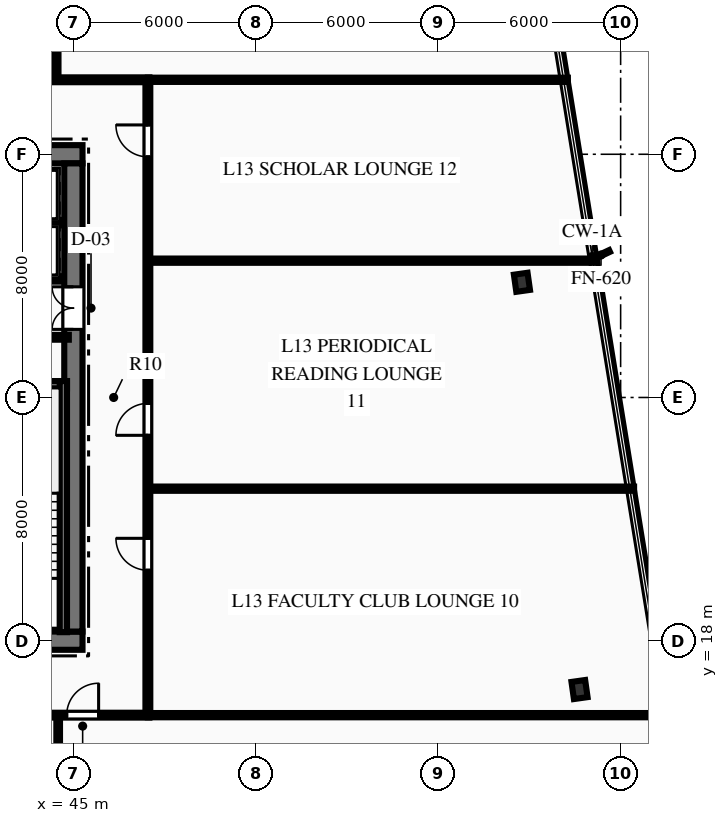
"""IFC4 building model, lengths in metres.
Left out: names, types, materials, properties, quantities, classifications, styles, units other than length and angle.
Written with IfcOpenShell. Run it as: python <this file> out.ifc"""

import sys

from ifc_helpers import new_model, si_unit, direction, frame, frame_2d, origin, origin_2d, place, context, subcontext, project, spatial, rectangle, i_section, extrude, element, fill, save


model = new_model("IFC4")
c1 = context("Model", 3, precision=1e-05, world=origin(), true_north=direction((0.0, 1.0)))
c2 = subcontext(c1, "Body", "Model", "MODEL_VIEW")
j1 = project(units=[si_unit("LENGTHUNIT", "METRE"), si_unit("PLANEANGLEUNIT", "RADIAN")], contexts=[c1])
p1 = place(None, origin())
s1 = spatial("IfcSite", under=j1, at=p1, CompositionType="ELEMENT")
p2 = place(p1, origin())
s2 = spatial("IfcBuilding", under=s1, at=p2, CompositionType="ELEMENT")
p3 = place(p2, frame((0.0, 0.0, 58.95)))
s3 = spatial("IfcBuildingStorey", under=s2, at=p3, CompositionType="ELEMENT", Elevation=58.95)
p4 = place(p3, frame((26.7, 18.0, 0.0), z_axis=(0.0, 0.0, 1.0), x_axis=(1.0, 0.0, 0.0)))
e1 = element("IfcWall", 1, at=p4, inside=s3, PredefinedType="SHEAR", context=c2, shape_type="SweptSolid", body=[
    extrude(rectangle(XDim=18.6, YDim=0.6, at=frame_2d((9.3, 0.0))), origin(), (0.0, 0.0, 1.0), 3.75),
])
p5 = place(p4, frame((7.4, 0.0, 0.0)))
e2 = element("IfcOpeningElement", 2, at=p5, cuts=e1, PredefinedType="OPENING", context=c2, shape_type="SweptSolid", body=[
    extrude(rectangle(XDim=1.1, YDim=2.15, at=frame_2d((0.55, 1.075))), frame((0.0, 0.31, 0.0), z_axis=(0.0, -1.0, 0.0), x_axis=(1.0, 0.0, 0.0)), (0.0, 0.0, 1.0), 0.62),
])
p6 = place(p4, frame((10.1, 0.0, 0.0)))
e3 = element("IfcOpeningElement", 3, at=p6, cuts=e1, PredefinedType="OPENING", context=c2, shape_type="SweptSolid", body=[
    extrude(rectangle(XDim=1.1, YDim=2.15, at=frame_2d((0.55, 1.075))), frame((0.0, 0.31, 0.0), z_axis=(0.0, -1.0, 0.0), x_axis=(1.0, 0.0, 0.0)), (0.0, 0.0, 1.0), 0.62),
])
p7 = place(p3, frame((26.7, 34.0, 0.0), z_axis=(0.0, 0.0, 1.0), x_axis=(1.0, 0.0, 0.0)))
e4 = element("IfcWall", 4, at=p7, inside=s3, PredefinedType="SHEAR", context=c2, shape_type="SweptSolid", body=[
    extrude(rectangle(XDim=18.6, YDim=0.6, at=frame_2d((9.3, 0.0))), origin(), (0.0, 0.0, 1.0), 3.75),
])
p8 = place(p7, frame((1.265, 0.0, 0.0)))
e5 = element("IfcOpeningElement", 5, at=p8, cuts=e4, PredefinedType="OPENING", context=c2, shape_type="SweptSolid", body=[
    extrude(rectangle(XDim=1.1, YDim=2.15, at=frame_2d((0.55, 1.075))), frame((0.0, 0.31, 0.0), z_axis=(0.0, -1.0, 0.0), x_axis=(1.0, 0.0, 0.0)), (0.0, 0.0, 1.0), 0.62),
])
p9 = place(p7, frame((3.515, 0.0, 0.0)))
e6 = element("IfcOpeningElement", 6, at=p9, cuts=e4, PredefinedType="OPENING", context=c2, shape_type="SweptSolid", body=[
    extrude(rectangle(XDim=1.1, YDim=2.15, at=frame_2d((0.55, 1.075))), frame((0.0, 0.31, 0.0), z_axis=(0.0, -1.0, 0.0), x_axis=(1.0, 0.0, 0.0)), (0.0, 0.0, 1.0), 0.62),
])
p10 = place(p7, frame((13.985, 0.0, 0.0)))
e7 = element("IfcOpeningElement", 7, at=p10, cuts=e4, PredefinedType="OPENING", context=c2, shape_type="SweptSolid", body=[
    extrude(rectangle(XDim=1.1, YDim=2.15, at=frame_2d((0.55, 1.075))), frame((0.0, 0.31, 0.0), z_axis=(0.0, -1.0, 0.0), x_axis=(1.0, 0.0, 0.0)), (0.0, 0.0, 1.0), 0.62),
])
p11 = place(p7, frame((16.235, 0.0, 0.0)))
e8 = element("IfcOpeningElement", 8, at=p11, cuts=e4, PredefinedType="OPENING", context=c2, shape_type="SweptSolid", body=[
    extrude(rectangle(XDim=1.1, YDim=2.15, at=frame_2d((0.55, 1.075))), frame((0.0, 0.31, 0.0), z_axis=(0.0, -1.0, 0.0), x_axis=(1.0, 0.0, 0.0)), (0.0, 0.0, 1.0), 0.62),
])
p12 = place(p3, frame((45.0, 18.3, 0.0), z_axis=(0.0, 0.0, 1.0), x_axis=(0.0, 1.0, 0.0)))
e9 = element("IfcWall", 9, at=p12, inside=s3, PredefinedType="SHEAR", context=c2, shape_type="SweptSolid", body=[
    extrude(rectangle(XDim=15.4, YDim=0.6, at=frame_2d((7.7, 0.0))), origin(), (0.0, 0.0, 1.0), 3.75),
])
p13 = place(p12, frame((9.94, 0.0, 0.0)))
e10 = element("IfcOpeningElement", 10, at=p13, cuts=e9, PredefinedType="OPENING", context=c2, shape_type="SweptSolid", body=[
    extrude(rectangle(XDim=1.4, YDim=2.2, at=frame_2d((0.7, 1.1))), frame((0.0, 0.31, 0.0), z_axis=(0.0, -1.0, 0.0), x_axis=(1.0, 0.0, 0.0)), (0.0, 0.0, 1.0), 0.62),
])
p14 = place(p3, frame((40.81, 26.42, 0.0), z_axis=(0.0, 0.0, 1.0), x_axis=(1.0, 0.0, 0.0)))
e11 = element("IfcWall", 11, at=p14, inside=s3, PredefinedType="SHEAR", context=c2, shape_type="SweptSolid", body=[
    extrude(rectangle(XDim=3.98, YDim=0.24, at=frame_2d((1.99, 0.0))), origin(), (0.0, 0.0, 1.0), 3.75),
])
p15 = place(p3, frame((44.67, 18.28, 0.0), z_axis=(0.0, 0.0, 1.0), x_axis=(0.0, 1.0, 0.0)))
e12 = element("IfcWall", 12, at=p15, inside=s3, PredefinedType="SHEAR", context=c2, shape_type="SweptSolid", body=[
    extrude(rectangle(XDim=8.26, YDim=0.24, at=frame_2d((4.13, 0.0))), origin(), (0.0, 0.0, 1.0), 3.75),
])
for number, where, z_axis, x_axis in (
    (13, (61.648, 16.393, 0.0), (0.0, 0.0, 1.0), (0.99, 0.14, 0.0)),
    (14, (59.753, 29.789, 0.0), (0.0, 0.0, 1.0), (0.99, 0.14, 0.0)),
):
    element("IfcColumn", number, at=place(p3, frame(where, z_axis=z_axis, x_axis=x_axis)), inside=s3, PredefinedType="COLUMN", context=c2, shape_type="SweptSolid", body=[
        extrude(i_section(OverallWidth=0.454, OverallDepth=0.569, WebThickness=0.078, FlangeThickness=0.125, at=origin_2d()), origin(), (0.0, 0.0, 1.0), 3.75),
    ])
p16 = place(p3, frame((40.8, 27.98, 0.0), z_axis=(0.0, 0.0, 1.0), x_axis=(1.0, 0.0, 0.0)))
e15 = element("IfcWall", 15, at=p16, inside=s3, PredefinedType="PARTITIONING", context=c2, shape_type="SweptSolid", body=[
    extrude(rectangle(XDim=4.05, YDim=0.16, at=frame_2d((2.025, 0.0))), origin(), (0.0, 0.0, 1.0), 3.44),
])
p17 = place(p16, frame((0.407, 0.0, 0.0)))
e16 = element("IfcOpeningElement", 16, at=p17, cuts=e15, PredefinedType="OPENING", context=c2, shape_type="SweptSolid", body=[
    extrude(rectangle(XDim=0.9, YDim=2.15, at=frame_2d((0.45, 1.075))), frame((0.0, 0.09, 0.0), z_axis=(0.0, -1.0, 0.0), x_axis=(1.0, 0.0, 0.0)), (0.0, 0.0, 1.0), 0.18),
])
p18 = place(p16, frame((2.2, 0.0, 0.0)))
e17 = element("IfcOpeningElement", 17, at=p18, cuts=e15, PredefinedType="OPENING", context=c2, shape_type="SweptSolid", body=[
    extrude(rectangle(XDim=0.9, YDim=2.15, at=frame_2d((0.45, 1.075))), frame((0.0, 0.09, 0.0), z_axis=(0.0, -1.0, 0.0), x_axis=(1.0, 0.0, 0.0)), (0.0, 0.0, 1.0), 0.18),
])
p19 = place(p3, frame((40.12, 29.9, 0.0), z_axis=(0.0, 0.0, 1.0), x_axis=(1.0, 0.0, 0.0)))
e18 = element("IfcWall", 18, at=p19, inside=s3, PredefinedType="PARTITIONING", context=c2, shape_type="SweptSolid", body=[
    extrude(rectangle(XDim=4.43, YDim=0.18, at=frame_2d((2.215, 0.0))), origin(), (0.0, 0.0, 1.0), 3.44),
])
p20 = place(p19, frame((0.565, 0.0, 0.0)))
e19 = element("IfcOpeningElement", 19, at=p20, cuts=e18, PredefinedType="OPENING", context=c2, shape_type="SweptSolid", body=[
    extrude(rectangle(XDim=1.1, YDim=2.15, at=frame_2d((0.55, 1.075))), frame((0.0, 0.1, 0.0), z_axis=(0.0, -1.0, 0.0), x_axis=(1.0, 0.0, 0.0)), (0.0, 0.0, 1.0), 0.2),
])
p21 = place(p19, frame((2.815, 0.0, 0.0)))
e20 = element("IfcOpeningElement", 20, at=p21, cuts=e18, PredefinedType="OPENING", context=c2, shape_type="SweptSolid", body=[
    extrude(rectangle(XDim=1.1, YDim=2.15, at=frame_2d((0.55, 1.075))), frame((0.0, 0.1, 0.0), z_axis=(0.0, -1.0, 0.0), x_axis=(1.0, 0.0, 0.0)), (0.0, 0.0, 1.0), 0.2),
])
p22 = place(p3, frame((40.12, 31.75, 0.0), z_axis=(0.0, 0.0, 1.0), x_axis=(1.0, 0.0, 0.0)))
e21 = element("IfcWall", 21, at=p22, inside=s3, PredefinedType="PARTITIONING", context=c2, shape_type="SweptSolid", body=[
    extrude(rectangle(XDim=4.43, YDim=0.18, at=frame_2d((2.215, 0.0))), origin(), (0.0, 0.0, 1.0), 3.44),
])
p23 = place(p3, frame((24.5, 15.55, 0.0), z_axis=(0.0, 0.0, 1.0), x_axis=(1.0, 0.0, 0.0)))
e22 = element("IfcWall", 22, at=p23, inside=s3, PredefinedType="PARTITIONING", context=c2, shape_type="SweptSolid", body=[
    extrude(rectangle(XDim=23.0, YDim=0.16, at=frame_2d((11.5, 0.0))), origin(), (0.0, 0.0, 1.0), 3.44),
])
p24 = place(p23, frame((3.101, 0.0, 0.0)))
e23 = element("IfcOpeningElement", 23, at=p24, cuts=e22, PredefinedType="OPENING", context=c2, shape_type="SweptSolid", body=[
    extrude(rectangle(XDim=1.05, YDim=2.15, at=frame_2d((0.525, 1.075))), frame((0.0, 0.09, 0.0), z_axis=(0.0, -1.0, 0.0), x_axis=(1.0, 0.0, 0.0)), (0.0, 0.0, 1.0), 0.18),
])
p25 = place(p23, frame((9.155, 0.0, 0.0)))
e24 = element("IfcOpeningElement", 24, at=p25, cuts=e22, PredefinedType="OPENING", context=c2, shape_type="SweptSolid", body=[
    extrude(rectangle(XDim=1.05, YDim=2.15, at=frame_2d((0.525, 1.075))), frame((0.0, 0.09, 0.0), z_axis=(0.0, -1.0, 0.0), x_axis=(1.0, 0.0, 0.0)), (0.0, 0.0, 1.0), 0.18),
])
p26 = place(p23, frame((20.28, 0.0, 0.0)))
e25 = element("IfcOpeningElement", 25, at=p26, cuts=e22, PredefinedType="OPENING", context=c2, shape_type="SweptSolid", body=[
    extrude(rectangle(XDim=1.05, YDim=2.15, at=frame_2d((0.525, 1.075))), frame((0.0, 0.09, 0.0), z_axis=(0.0, -1.0, 0.0), x_axis=(1.0, 0.0, 0.0)), (0.0, 0.0, 1.0), 0.18),
])
p27 = place(p3, frame((24.5, 36.45, 0.0), z_axis=(0.0, 0.0, 1.0), x_axis=(1.0, 0.0, 0.0)))
e26 = element("IfcWall", 26, at=p27, inside=s3, PredefinedType="PARTITIONING", context=c2, shape_type="SweptSolid", body=[
    extrude(rectangle(XDim=23.0, YDim=0.16, at=frame_2d((11.5, 0.0))), origin(), (0.0, 0.0, 1.0), 3.44),
])
p28 = place(p27, frame((13.75, 0.0, 0.0)))
e27 = element("IfcOpeningElement", 27, at=p28, cuts=e26, PredefinedType="OPENING", context=c2, shape_type="SweptSolid", body=[
    extrude(rectangle(XDim=0.9, YDim=2.15, at=frame_2d((0.45, 1.075))), frame((0.0, 0.09, 0.0), z_axis=(0.0, -1.0, 0.0), x_axis=(1.0, 0.0, 0.0)), (0.0, 0.0, 1.0), 0.18),
])
p29 = place(p27, frame((16.05, 0.0, 0.0)))
e28 = element("IfcOpeningElement", 28, at=p29, cuts=e26, PredefinedType="OPENING", context=c2, shape_type="SweptSolid", body=[
    extrude(rectangle(XDim=0.9, YDim=2.15, at=frame_2d((0.45, 1.075))), frame((0.0, 0.09, 0.0), z_axis=(0.0, -1.0, 0.0), x_axis=(1.0, 0.0, 0.0)), (0.0, 0.0, 1.0), 0.18),
])
p30 = place(p27, frame((18.3, 0.0, 0.0)))
e29 = element("IfcOpeningElement", 29, at=p30, cuts=e26, PredefinedType="OPENING", context=c2, shape_type="SweptSolid", body=[
    extrude(rectangle(XDim=1.0, YDim=2.15, at=frame_2d((0.5, 1.075))), frame((0.0, 0.09, 0.0), z_axis=(0.0, -1.0, 0.0), x_axis=(1.0, 0.0, 0.0)), (0.0, 0.0, 1.0), 0.18),
])
p31 = place(p27, frame((3.751, 0.0, 0.0)))
e30 = element("IfcOpeningElement", 30, at=p31, cuts=e26, PredefinedType="OPENING", context=c2, shape_type="SweptSolid", body=[
    extrude(rectangle(XDim=1.05, YDim=2.15, at=frame_2d((0.525, 1.075))), frame((0.0, 0.09, 0.0), z_axis=(0.0, -1.0, 0.0), x_axis=(1.0, 0.0, 0.0)), (0.0, 0.0, 1.0), 0.18),
])
p32 = place(p3, frame((47.45, 15.55, 0.0), z_axis=(0.0, 0.0, 1.0), x_axis=(0.0, 1.0, 0.0)))
e31 = element("IfcWall", 31, at=p32, inside=s3, PredefinedType="PARTITIONING", context=c2, shape_type="SweptSolid", body=[
    extrude(rectangle(XDim=20.9, YDim=0.16, at=frame_2d((10.45, 0.0))), origin(), (0.0, 0.0, 1.0), 3.44),
])
p33 = place(p32, frame((4.767, 0.0, 0.0)))
e32 = element("IfcOpeningElement", 32, at=p33, cuts=e31, PredefinedType="OPENING", context=c2, shape_type="SweptSolid", body=[
    extrude(rectangle(XDim=1.05, YDim=2.15, at=frame_2d((0.525, 1.075))), frame((0.0, 0.09, 0.0), z_axis=(0.0, -1.0, 0.0), x_axis=(1.0, 0.0, 0.0)), (0.0, 0.0, 1.0), 0.18),
])
p34 = place(p32, frame((9.205, 0.0, 0.0)))
e33 = element("IfcOpeningElement", 33, at=p34, cuts=e31, PredefinedType="OPENING", context=c2, shape_type="SweptSolid", body=[
    extrude(rectangle(XDim=1.05, YDim=2.15, at=frame_2d((0.525, 1.075))), frame((0.0, 0.09, 0.0), z_axis=(0.0, -1.0, 0.0), x_axis=(1.0, 0.0, 0.0)), (0.0, 0.0, 1.0), 0.18),
])
p35 = place(p32, frame((18.365, 0.0, 0.0)))
e34 = element("IfcOpeningElement", 34, at=p35, cuts=e31, PredefinedType="OPENING", context=c2, shape_type="SweptSolid", body=[
    extrude(rectangle(XDim=1.05, YDim=2.15, at=frame_2d((0.525, 1.075))), frame((0.0, 0.09, 0.0), z_axis=(0.0, -1.0, 0.0), x_axis=(1.0, 0.0, 0.0)), (0.0, 0.0, 1.0), 0.18),
])
p36 = place(p3, frame((44.45, 36.45, 0.0), z_axis=(0.0, 0.0, 1.0), x_axis=(0.0, 1.0, 0.0)))
e35 = element("IfcWall", 35, at=p36, inside=s3, PredefinedType="PARTITIONING", context=c2, shape_type="SweptSolid", body=[
    extrude(rectangle(XDim=3.9, YDim=0.12, at=frame_2d((1.95, 0.0))), origin(), (0.0, 0.0, 1.0), 3.44),
])
p37 = place(p3, frame((47.45, 15.55, 0.0), z_axis=(0.0, 0.0, 1.0), x_axis=(1.0, 0.0, 0.0)))
e36 = element("IfcWall", 36, at=p37, inside=s3, PredefinedType="PARTITIONING", context=c2, shape_type="SweptSolid", body=[
    extrude(rectangle(XDim=17.199, YDim=0.14, at=frame_2d((8.6, 0.0))), origin(), (0.0, 0.0, 1.0), 3.44),
])
p38 = place(p3, frame((47.45, 36.45, 0.0), z_axis=(0.0, 0.0, 1.0), x_axis=(1.0, 0.0, 0.0)))
e37 = element("IfcWall", 37, at=p38, inside=s3, PredefinedType="PARTITIONING", context=c2, shape_type="SweptSolid", body=[
    extrude(rectangle(XDim=13.814, YDim=0.14, at=frame_2d((6.907, 0.0))), origin(), (0.0, 0.0, 1.0), 3.44),
])
p39 = place(p3, frame((44.5, 2.269, 0.0), z_axis=(0.0, 0.0, 1.0), x_axis=(0.0, 1.0, 0.0)))
e38 = element("IfcWall", 38, at=p39, inside=s3, PredefinedType="PARTITIONING", context=c2, shape_type="SweptSolid", body=[
    extrude(rectangle(XDim=13.281, YDim=0.12, at=frame_2d((6.641, 0.0))), origin(), (0.0, 0.0, 1.0), 3.44),
])
p40 = place(p3, frame((47.45, 23.0, 0.0), z_axis=(0.0, 0.0, 1.0), x_axis=(1.0, 0.0, 0.0)))
e39 = element("IfcWall", 39, at=p40, inside=s3, PredefinedType="PARTITIONING", context=c2, shape_type="SweptSolid", body=[
    extrude(rectangle(XDim=15.993, YDim=0.14, at=frame_2d((7.996, 0.0))), origin(), (0.0, 0.0, 1.0), 3.44),
])
p41 = place(p3, frame((47.45, 30.5, 0.0), z_axis=(0.0, 0.0, 1.0), x_axis=(1.0, 0.0, 0.0)))
e40 = element("IfcWall", 40, at=p41, inside=s3, PredefinedType="PARTITIONING", context=c2, shape_type="SweptSolid", body=[
    extrude(rectangle(XDim=14.778, YDim=0.14, at=frame_2d((7.389, 0.0))), origin(), (0.0, 0.0, 1.0), 3.44),
])
p42 = place(p13, origin())
e41 = element("IfcDoor", 41, at=p42, inside=s3, OperationType="DOUBLE_DOOR_SINGLE_SWING", PredefinedType="DOOR", context=c2, shape_type="SweptSolid", body=[
    extrude(rectangle(XDim=1.4, YDim=2.2, at=frame_2d((0.7, 1.1))), frame((0.0, 0.025, 0.0), z_axis=(0.0, -1.0, 0.0), x_axis=(1.0, 0.0, 0.0)), (0.0, 0.0, 1.0), 0.05),
])
fill(e10, e41)
p43 = place(p26, origin())
e42 = element("IfcDoor", 42, at=p43, inside=s3, OperationType="SINGLE_SWING_RIGHT", PredefinedType="DOOR", context=c2, shape_type="SweptSolid", body=[
    extrude(rectangle(XDim=1.05, YDim=2.15, at=frame_2d((0.525, 1.075))), frame((0.0, 0.025, 0.0), z_axis=(0.0, -1.0, 0.0), x_axis=(1.0, 0.0, 0.0)), (0.0, 0.0, 1.0), 0.05),
])
fill(e25, e42)
p44 = place(p33, origin())
e43 = element("IfcDoor", 43, at=p44, inside=s3, OperationType="SINGLE_SWING_RIGHT", PredefinedType="DOOR", context=c2, shape_type="SweptSolid", body=[
    extrude(rectangle(XDim=1.05, YDim=2.15, at=frame_2d((0.525, 1.075))), frame((0.0, 0.025, 0.0), z_axis=(0.0, -1.0, 0.0), x_axis=(1.0, 0.0, 0.0)), (0.0, 0.0, 1.0), 0.05),
])
fill(e32, e43)
p45 = place(p34, origin())
e44 = element("IfcDoor", 44, at=p45, inside=s3, OperationType="SINGLE_SWING_LEFT", PredefinedType="DOOR", context=c2, shape_type="SweptSolid", body=[
    extrude(rectangle(XDim=1.05, YDim=2.15, at=frame_2d((0.525, 1.075))), frame((0.0, 0.025, 0.0), z_axis=(0.0, -1.0, 0.0), x_axis=(1.0, 0.0, 0.0)), (0.0, 0.0, 1.0), 0.05),
])
fill(e33, e44)
p46 = place(p35, origin())
e45 = element("IfcDoor", 45, at=p46, inside=s3, OperationType="SINGLE_SWING_RIGHT", PredefinedType="DOOR", context=c2, shape_type="SweptSolid", body=[
    extrude(rectangle(XDim=1.05, YDim=2.15, at=frame_2d((0.525, 1.075))), frame((0.0, 0.025, 0.0), z_axis=(0.0, -1.0, 0.0), x_axis=(1.0, 0.0, 0.0)), (0.0, 0.0, 1.0), 0.05),
])
fill(e34, e45)
save(model, sys.argv[1])
